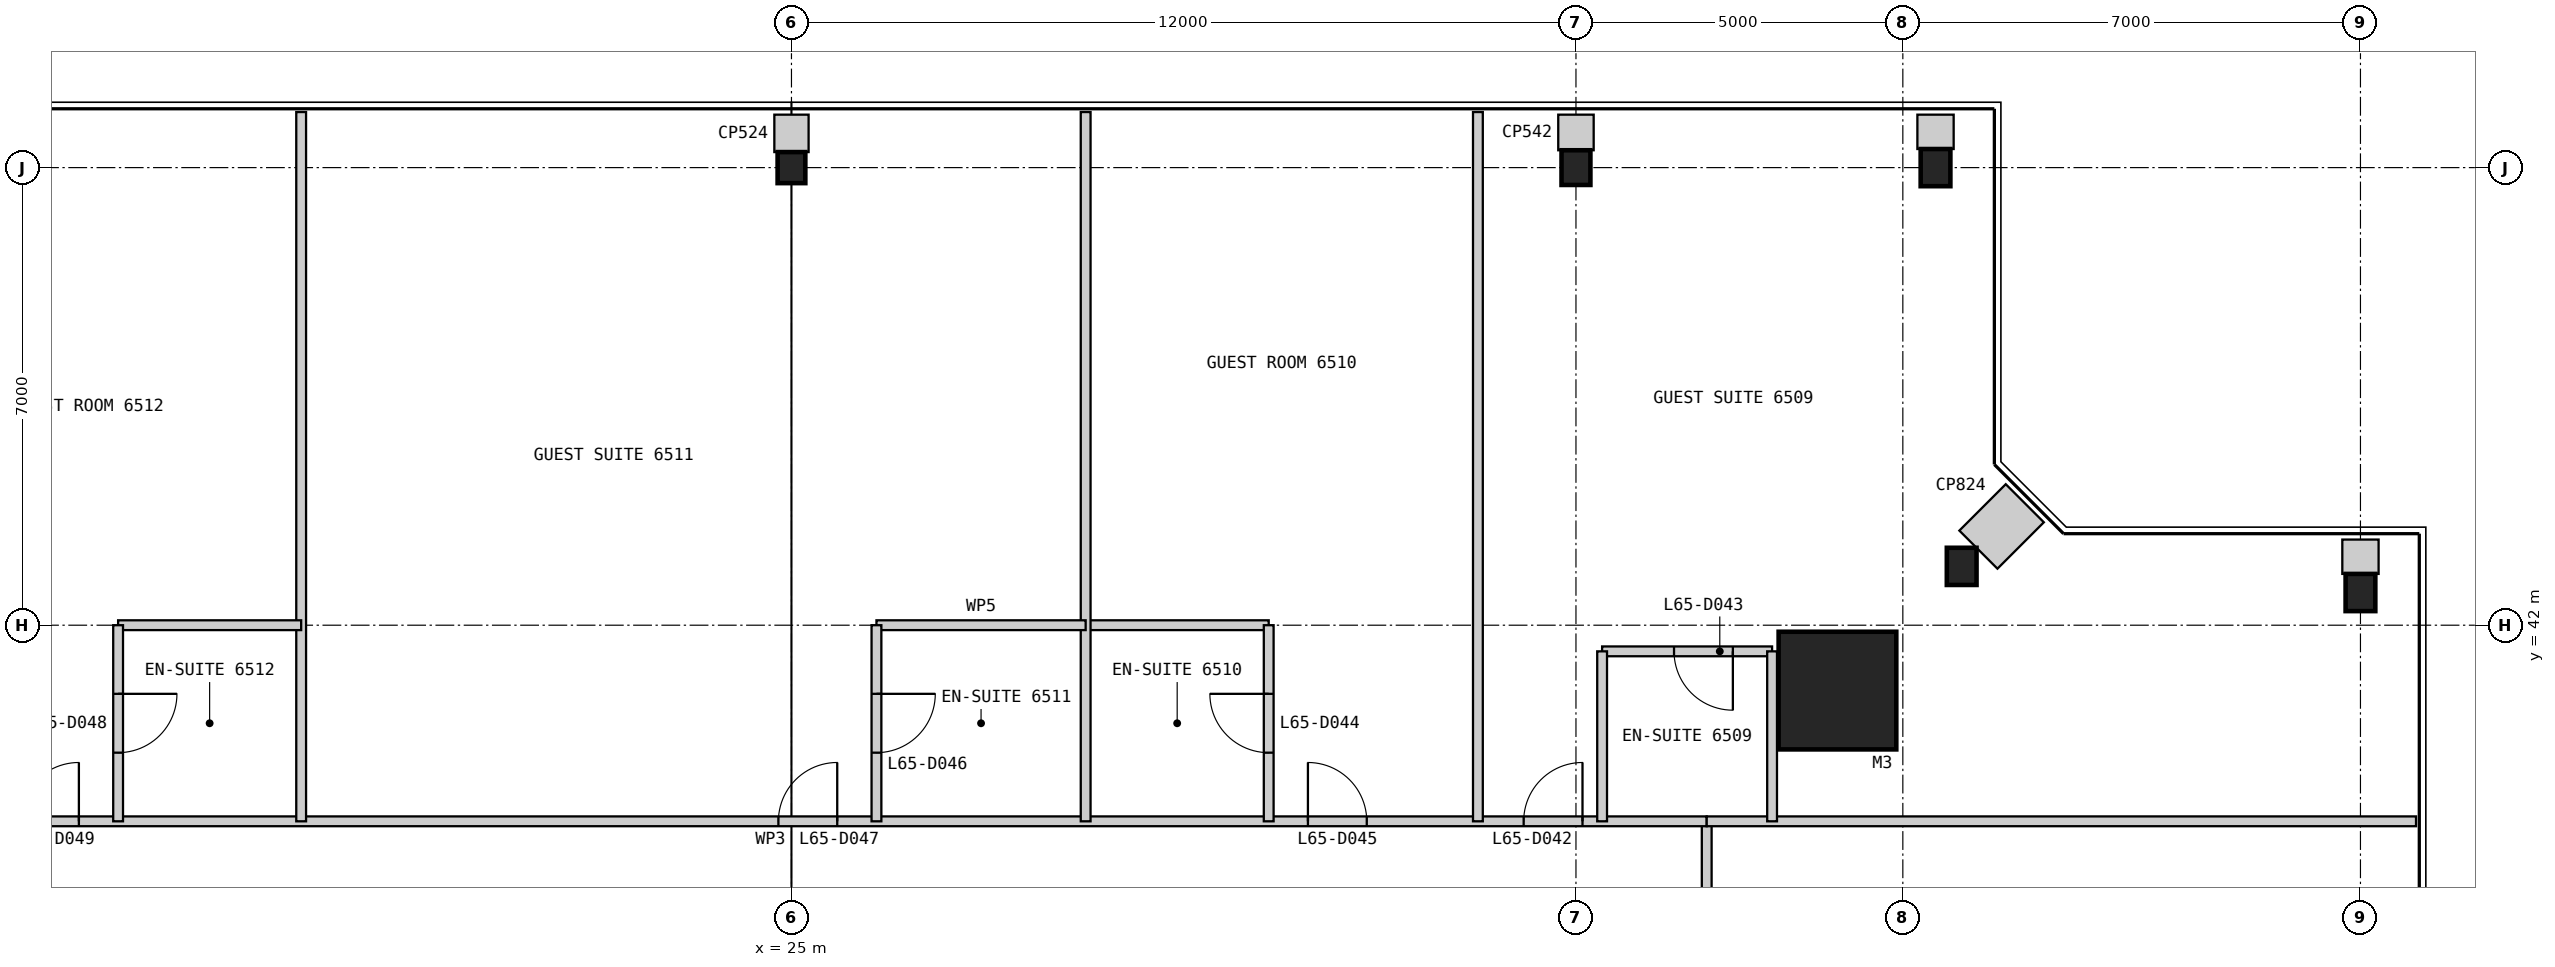
"""IFC4 building model, lengths in metres.
Left out: names, types, materials, properties, quantities, classifications, styles, units other than length and angle.
Written with IfcOpenShell. Run it as: python <this file> out.ifc"""

import sys

from ifc_helpers import new_model, si_unit, direction, frame, frame_2d, origin, origin_2d, place, context, subcontext, project, spatial, rectangle, i_section, extrude, element, fill, save


model = new_model("IFC4")
c1 = context("Model", 3, precision=1e-05, world=origin(), true_north=direction((0.0, 1.0)))
c2 = subcontext(c1, "Body", "Model", "MODEL_VIEW")
j1 = project(units=[si_unit("LENGTHUNIT", "METRE"), si_unit("PLANEANGLEUNIT", "RADIAN")], contexts=[c1])
p1 = place(None, origin())
s1 = spatial("IfcSite", under=j1, at=p1, CompositionType="ELEMENT")
p2 = place(p1, origin())
s2 = spatial("IfcBuilding", under=s1, at=p2, CompositionType="ELEMENT")
p3 = place(p2, frame((0.0, 0.0, 273.0)))
s3 = spatial("IfcBuildingStorey", under=s2, at=p3, CompositionType="ELEMENT", Elevation=273.0)
p4 = place(p3, frame((41.0, 41.0, 0.0), z_axis=(0.0, 0.0, 1.0), x_axis=(1.0, 0.0, 0.0)))
e1 = element("IfcColumn", 1, at=p4, inside=s3, PredefinedType="COLUMN", context=c2, shape_type="SweptSolid", body=[
    extrude(rectangle(XDim=1.8, YDim=1.8, at=origin_2d()), origin(), (0.0, 0.0, 1.0), 3.4),
])
for number, where, z_axis, x_axis in (
    (2, (49.0, 42.5, 0.0), (0.0, 0.0, 1.0), (1.0, 0.0, 0.0)),
    (3, (42.9, 42.9, 0.0), (0.0, 0.0, 1.0), (1.0, 0.0, 0.0)),
    (4, (42.5, 49.0, 0.0), (0.0, 0.0, 1.0), (1.0, 0.0, 0.0)),
):
    element("IfcColumn", number, at=place(p3, frame(where, z_axis=z_axis, x_axis=x_axis)), inside=s3, PredefinedType="COLUMN", context=c2, shape_type="SweptSolid", body=[
        extrude(i_section(OverallWidth=0.455, OverallDepth=0.569, WebThickness=0.078, FlangeThickness=0.125, at=origin_2d()), origin(), (0.0, 0.0, 1.0), 3.4),
    ])
p5 = place(p3, frame((37.0, 49.0, 0.0), z_axis=(0.0, 0.0, 1.0), x_axis=(1.0, 0.0, 0.0)))
e5 = element("IfcColumn", 5, at=p5, inside=s3, PredefinedType="COLUMN", context=c2, shape_type="SweptSolid", body=[
    extrude(i_section(OverallWidth=0.442, OverallDepth=0.531, WebThickness=0.066, FlangeThickness=0.106, at=origin_2d()), origin(), (0.0, 0.0, 1.0), 3.4),
])
p6 = place(p3, frame((25.0, 49.0, 0.0), z_axis=(0.0, 0.0, 1.0), x_axis=(1.0, 0.0, 0.0)))
e6 = element("IfcColumn", 6, at=p6, inside=s3, PredefinedType="COLUMN", context=c2, shape_type="SweptSolid", body=[
    extrude(i_section(OverallWidth=0.424, OverallDepth=0.475, WebThickness=0.048, FlangeThickness=0.077, at=origin_2d()), origin(), (0.0, 0.0, 1.0), 3.4),
])
p7 = place(p3, frame((39.0, 11.0, 0.0), z_axis=(0.0, 0.0, 1.0), x_axis=(0.0, 1.0, 0.0)))
e7 = element("IfcWall", 7, at=p7, inside=s3, PredefinedType="PARTITIONING", context=c2, shape_type="SweptSolid", body=[
    extrude(rectangle(XDim=28.0, YDim=0.15, at=frame_2d((14.0, 0.0))), origin(), (0.0, 0.0, 1.0), 2.844),
])
p8 = place(p7, frame((2.075, 0.0, 0.0)))
e8 = element("IfcOpeningElement", 8, at=p8, cuts=e7, PredefinedType="OPENING", context=c2, shape_type="SweptSolid", body=[
    extrude(rectangle(XDim=0.9, YDim=2.1, at=frame_2d((0.45, 1.05))), frame((0.0, 0.085, 0.0), z_axis=(0.0, -1.0, 0.0), x_axis=(1.0, 0.0, 0.0)), (0.0, 0.0, 1.0), 0.17),
])
p9 = place(p7, frame((5.2, 0.0, 0.0)))
e9 = element("IfcOpeningElement", 9, at=p9, cuts=e7, PredefinedType="OPENING", context=c2, shape_type="SweptSolid", body=[
    extrude(rectangle(XDim=0.9, YDim=2.1, at=frame_2d((0.45, 1.05))), frame((0.0, 0.085, 0.0), z_axis=(0.0, -1.0, 0.0), x_axis=(1.0, 0.0, 0.0)), (0.0, 0.0, 1.0), 0.17),
])
p10 = place(p7, frame((13.3, 0.0, 0.0)))
e10 = element("IfcOpeningElement", 10, at=p10, cuts=e7, PredefinedType="OPENING", context=c2, shape_type="SweptSolid", body=[
    extrude(rectangle(XDim=0.9, YDim=2.1, at=frame_2d((0.45, 1.05))), frame((0.0, 0.085, 0.0), z_axis=(0.0, -1.0, 0.0), x_axis=(1.0, 0.0, 0.0)), (0.0, 0.0, 1.0), 0.17),
])
p11 = place(p7, frame((24.9, 0.0, 0.0)))
e11 = element("IfcOpeningElement", 11, at=p11, cuts=e7, PredefinedType="OPENING", context=c2, shape_type="SweptSolid", body=[
    extrude(rectangle(XDim=0.9, YDim=2.1, at=frame_2d((0.45, 1.05))), frame((0.0, 0.085, 0.0), z_axis=(0.0, -1.0, 0.0), x_axis=(1.0, 0.0, 0.0)), (0.0, 0.0, 1.0), 0.17),
])
p12 = place(p3, frame((39.0, 39.0, 0.0), z_axis=(0.0, 0.0, 1.0), x_axis=(-1.0, 0.0, 0.0)))
e12 = element("IfcWall", 12, at=p12, inside=s3, PredefinedType="PARTITIONING", context=c2, shape_type="SweptSolid", body=[
    extrude(rectangle(XDim=28.0, YDim=0.15, at=frame_2d((14.0, 0.0))), origin(), (0.0, 0.0, 1.0), 2.844),
])
p13 = place(p12, frame((1.9, 0.0, 0.0)))
e13 = element("IfcOpeningElement", 13, at=p13, cuts=e12, PredefinedType="OPENING", context=c2, shape_type="SweptSolid", body=[
    extrude(rectangle(XDim=0.9, YDim=2.1, at=frame_2d((0.45, 1.05))), frame((0.0, 0.085, 0.0), z_axis=(0.0, -1.0, 0.0), x_axis=(1.0, 0.0, 0.0)), (0.0, 0.0, 1.0), 0.17),
])
p14 = place(p12, frame((5.2, 0.0, 0.0)))
e14 = element("IfcOpeningElement", 14, at=p14, cuts=e12, PredefinedType="OPENING", context=c2, shape_type="SweptSolid", body=[
    extrude(rectangle(XDim=0.9, YDim=2.1, at=frame_2d((0.45, 1.05))), frame((0.0, 0.085, 0.0), z_axis=(0.0, -1.0, 0.0), x_axis=(1.0, 0.0, 0.0)), (0.0, 0.0, 1.0), 0.17),
])
p15 = place(p12, frame((13.3, 0.0, 0.0)))
e15 = element("IfcOpeningElement", 15, at=p15, cuts=e12, PredefinedType="OPENING", context=c2, shape_type="SweptSolid", body=[
    extrude(rectangle(XDim=0.9, YDim=2.1, at=frame_2d((0.45, 1.05))), frame((0.0, 0.085, 0.0), z_axis=(0.0, -1.0, 0.0), x_axis=(1.0, 0.0, 0.0)), (0.0, 0.0, 1.0), 0.17),
])
p16 = place(p12, frame((24.9, 0.0, 0.0)))
e16 = element("IfcOpeningElement", 16, at=p16, cuts=e12, PredefinedType="OPENING", context=c2, shape_type="SweptSolid", body=[
    extrude(rectangle(XDim=0.9, YDim=2.1, at=frame_2d((0.45, 1.05))), frame((0.0, 0.085, 0.0), z_axis=(0.0, -1.0, 0.0), x_axis=(1.0, 0.0, 0.0)), (0.0, 0.0, 1.0), 0.17),
])
p17 = place(p3, frame((49.85, 39.0, 0.0), z_axis=(0.0, 0.0, 1.0), x_axis=(-1.0, 0.0, 0.0)))
e17 = element("IfcWall", 17, at=p17, inside=s3, PredefinedType="PARTITIONING", context=c2, shape_type="SweptSolid", body=[
    extrude(rectangle(XDim=10.85, YDim=0.15, at=frame_2d((5.425, 0.0))), origin(), (0.0, 0.0, 1.0), 2.844),
])
p18 = place(p3, frame((40.0, 41.6, 0.0), z_axis=(0.0, 0.0, 1.0), x_axis=(-1.0, 0.0, 0.0)))
e18 = element("IfcWall", 18, at=p18, inside=s3, PredefinedType="PARTITIONING", context=c2, shape_type="SweptSolid", body=[
    extrude(rectangle(XDim=2.6, YDim=0.15, at=frame_2d((1.3, 0.0))), origin(), (0.0, 0.0, 1.0), 3.25),
])
p19 = place(p18, frame((0.6, 0.0, 0.0)))
e19 = element("IfcOpeningElement", 19, at=p19, cuts=e18, PredefinedType="OPENING", context=c2, shape_type="SweptSolid", body=[
    extrude(rectangle(XDim=0.9, YDim=2.1, at=frame_2d((0.45, 1.05))), frame((0.0, 0.085, 0.0), z_axis=(0.0, -1.0, 0.0), x_axis=(1.0, 0.0, 0.0)), (0.0, 0.0, 1.0), 0.17),
])
for number, where, z_axis, x_axis in (
    (20, (40.0, 41.6, 0.0), (0.0, 0.0, 1.0), (0.0, -1.0, 0.0)),
    (21, (37.4, 41.6, 0.0), (0.0, 0.0, 1.0), (0.0, -1.0, 0.0)),
):
    element("IfcWall", number, at=place(p3, frame(where, z_axis=z_axis, x_axis=x_axis)), inside=s3, PredefinedType="PARTITIONING", context=c2, shape_type="SweptSolid", body=[
        extrude(rectangle(XDim=2.6, YDim=0.15, at=frame_2d((1.3, 0.0))), origin(), (0.0, 0.0, 1.0), 3.25),
    ])
p20 = place(p3, frame((35.5, 49.85, 0.0), z_axis=(0.0, 0.0, 1.0), x_axis=(0.0, -1.0, 0.0)))
e22 = element("IfcWall", 22, at=p20, inside=s3, PredefinedType="PARTITIONING", context=c2, shape_type="SweptSolid", body=[
    extrude(rectangle(XDim=10.85, YDim=0.15, at=frame_2d((5.425, 0.0))), origin(), (0.0, 0.0, 1.0), 3.25),
])
p21 = place(p3, frame((32.3, 42.0, 0.0), z_axis=(0.0, 0.0, 1.0), x_axis=(-1.0, 0.0, 0.0)))
e23 = element("IfcWall", 23, at=p21, inside=s3, PredefinedType="PARTITIONING", context=c2, shape_type="SweptSolid", body=[
    extrude(rectangle(XDim=2.8, YDim=0.15, at=frame_2d((1.4, 0.0))), origin(), (0.0, 0.0, 1.0), 3.25),
])
p22 = place(p3, frame((32.3, 42.0, 0.0), z_axis=(0.0, 0.0, 1.0), x_axis=(0.0, -1.0, 0.0)))
e24 = element("IfcWall", 24, at=p22, inside=s3, PredefinedType="PARTITIONING", context=c2, shape_type="SweptSolid", body=[
    extrude(rectangle(XDim=3.0, YDim=0.15, at=frame_2d((1.5, 0.0))), origin(), (0.0, 0.0, 1.0), 3.25),
])
p23 = place(p22, frame((1.05, 0.0, 0.0)))
e25 = element("IfcOpeningElement", 25, at=p23, cuts=e24, PredefinedType="OPENING", context=c2, shape_type="SweptSolid", body=[
    extrude(rectangle(XDim=0.9, YDim=2.1, at=frame_2d((0.45, 1.05))), frame((0.0, 0.085, 0.0), z_axis=(0.0, -1.0, 0.0), x_axis=(1.0, 0.0, 0.0)), (0.0, 0.0, 1.0), 0.17),
])
p24 = place(p3, frame((29.5, 49.85, 0.0), z_axis=(0.0, 0.0, 1.0), x_axis=(0.0, -1.0, 0.0)))
e26 = element("IfcWall", 26, at=p24, inside=s3, PredefinedType="PARTITIONING", context=c2, shape_type="SweptSolid", body=[
    extrude(rectangle(XDim=10.85, YDim=0.15, at=frame_2d((5.425, 0.0))), origin(), (0.0, 0.0, 1.0), 3.25),
])
p25 = place(p3, frame((29.5, 42.0, 0.0), z_axis=(0.0, 0.0, 1.0), x_axis=(-1.0, 0.0, 0.0)))
e27 = element("IfcWall", 27, at=p25, inside=s3, PredefinedType="PARTITIONING", context=c2, shape_type="SweptSolid", body=[
    extrude(rectangle(XDim=3.2, YDim=0.15, at=frame_2d((1.6, 0.0))), origin(), (0.0, 0.0, 1.0), 3.25),
])
p26 = place(p3, frame((26.3, 42.0, 0.0), z_axis=(0.0, 0.0, 1.0), x_axis=(0.0, -1.0, 0.0)))
e28 = element("IfcWall", 28, at=p26, inside=s3, PredefinedType="PARTITIONING", context=c2, shape_type="SweptSolid", body=[
    extrude(rectangle(XDim=3.0, YDim=0.15, at=frame_2d((1.5, 0.0))), origin(), (0.0, 0.0, 1.0), 3.25),
])
p27 = place(p26, frame((1.05, 0.0, 0.0)))
e29 = element("IfcOpeningElement", 29, at=p27, cuts=e28, PredefinedType="OPENING", context=c2, shape_type="SweptSolid", body=[
    extrude(rectangle(XDim=0.9, YDim=2.1, at=frame_2d((0.45, 1.05))), frame((0.0, 0.085, 0.0), z_axis=(0.0, -1.0, 0.0), x_axis=(1.0, 0.0, 0.0)), (0.0, 0.0, 1.0), 0.17),
])
p28 = place(p3, frame((17.5, 49.85, 0.0), z_axis=(0.0, 0.0, 1.0), x_axis=(0.0, -1.0, 0.0)))
e30 = element("IfcWall", 30, at=p28, inside=s3, PredefinedType="PARTITIONING", context=c2, shape_type="SweptSolid", body=[
    extrude(rectangle(XDim=10.85, YDim=0.15, at=frame_2d((5.425, 0.0))), origin(), (0.0, 0.0, 1.0), 3.25),
])
p29 = place(p3, frame((17.5, 42.0, 0.0), z_axis=(0.0, 0.0, 1.0), x_axis=(-1.0, 0.0, 0.0)))
e31 = element("IfcWall", 31, at=p29, inside=s3, PredefinedType="PARTITIONING", context=c2, shape_type="SweptSolid", body=[
    extrude(rectangle(XDim=2.8, YDim=0.15, at=frame_2d((1.4, 0.0))), origin(), (0.0, 0.0, 1.0), 3.25),
])
p30 = place(p3, frame((14.7, 42.0, 0.0), z_axis=(0.0, 0.0, 1.0), x_axis=(0.0, -1.0, 0.0)))
e32 = element("IfcWall", 32, at=p30, inside=s3, PredefinedType="PARTITIONING", context=c2, shape_type="SweptSolid", body=[
    extrude(rectangle(XDim=3.0, YDim=0.15, at=frame_2d((1.5, 0.0))), origin(), (0.0, 0.0, 1.0), 3.25),
])
p31 = place(p30, frame((1.05, 0.0, 0.0)))
e33 = element("IfcOpeningElement", 33, at=p31, cuts=e32, PredefinedType="OPENING", context=c2, shape_type="SweptSolid", body=[
    extrude(rectangle(XDim=0.9, YDim=2.1, at=frame_2d((0.45, 1.05))), frame((0.0, 0.085, 0.0), z_axis=(0.0, -1.0, 0.0), x_axis=(1.0, 0.0, 0.0)), (0.0, 0.0, 1.0), 0.17),
])
p32 = place(p3, frame((49.0, 43.31, 0.0), z_axis=(0.0, 0.0, 1.0), x_axis=(0.0, -1.0, 0.0)))
e34 = element("IfcWall", 34, at=p32, inside=s3, PredefinedType="PARTITIONING", context=c2, shape_type="SweptSolid", body=[
    extrude(rectangle(XDim=0.526, YDim=0.555, at=frame_2d((0.263, 0.0))), origin(), (0.0, 0.0, 1.0), 3.25),
])
p33 = place(p3, frame((43.866, 43.866, 0.0), z_axis=(0.0, 0.0, 1.0), x_axis=(-0.707106781187, -0.707106781187, 0.0)))
e35 = element("IfcWall", 35, at=p33, inside=s3, PredefinedType="PARTITIONING", context=c2, shape_type="SweptSolid", body=[
    extrude(rectangle(XDim=1.004, YDim=0.824, at=frame_2d((0.502, 0.0))), origin(), (0.0, 0.0, 1.0), 3.25),
])
p34 = place(p3, frame((42.5, 49.81, 0.0), z_axis=(0.0, 0.0, 1.0), x_axis=(0.0, -1.0, 0.0)))
e36 = element("IfcWall", 36, at=p34, inside=s3, PredefinedType="PARTITIONING", context=c2, shape_type="SweptSolid", body=[
    extrude(rectangle(XDim=0.526, YDim=0.555, at=frame_2d((0.263, 0.0))), origin(), (0.0, 0.0, 1.0), 3.25),
])
p35 = place(p3, frame((37.0, 49.81, 0.0), z_axis=(0.0, 0.0, 1.0), x_axis=(0.0, -1.0, 0.0)))
e37 = element("IfcWall", 37, at=p35, inside=s3, PredefinedType="PARTITIONING", context=c2, shape_type="SweptSolid", body=[
    extrude(rectangle(XDim=0.545, YDim=0.542, at=frame_2d((0.272, 0.0))), origin(), (0.0, 0.0, 1.0), 3.25),
])
p36 = place(p3, frame((25.0, 49.81, 0.0), z_axis=(0.0, 0.0, 1.0), x_axis=(0.0, -1.0, 0.0)))
e38 = element("IfcWall", 38, at=p36, inside=s3, PredefinedType="PARTITIONING", context=c2, shape_type="SweptSolid", body=[
    extrude(rectangle(XDim=0.573, YDim=0.524, at=frame_2d((0.286, 0.0))), origin(), (0.0, 0.0, 1.0), 3.25),
])
p37 = place(p13, frame((0.9, 0.0, 0.0), z_axis=(0.0, 0.0, 1.0), x_axis=(-1.0, 0.0, 0.0)))
e39 = element("IfcDoor", 39, at=p37, inside=s3, OperationType="SINGLE_SWING_RIGHT", PredefinedType="DOOR", context=c2, shape_type="SweptSolid", body=[
    extrude(rectangle(XDim=0.9, YDim=2.1, at=frame_2d((0.45, 1.05))), frame((0.0, 0.025, 0.0), z_axis=(0.0, -1.0, 0.0), x_axis=(1.0, 0.0, 0.0)), (0.0, 0.0, 1.0), 0.05),
])
fill(e13, e39)
p38 = place(p19, origin())
e40 = element("IfcDoor", 40, at=p38, inside=s3, OperationType="SINGLE_SWING_LEFT", PredefinedType="DOOR", context=c2, shape_type="SweptSolid", body=[
    extrude(rectangle(XDim=0.9, YDim=2.1, at=frame_2d((0.45, 1.05))), frame((0.0, 0.025, 0.0), z_axis=(0.0, -1.0, 0.0), x_axis=(1.0, 0.0, 0.0)), (0.0, 0.0, 1.0), 0.05),
])
fill(e19, e40)
p39 = place(p23, frame((0.9, 0.0, 0.0), z_axis=(0.0, 0.0, 1.0), x_axis=(-1.0, 0.0, 0.0)))
e41 = element("IfcDoor", 41, at=p39, inside=s3, OperationType="SINGLE_SWING_RIGHT", PredefinedType="DOOR", context=c2, shape_type="SweptSolid", body=[
    extrude(rectangle(XDim=0.9, YDim=2.1, at=frame_2d((0.45, 1.05))), frame((0.0, 0.025, 0.0), z_axis=(0.0, -1.0, 0.0), x_axis=(1.0, 0.0, 0.0)), (0.0, 0.0, 1.0), 0.05),
])
fill(e25, e41)
p40 = place(p14, frame((0.9, 0.0, 0.0), z_axis=(0.0, 0.0, 1.0), x_axis=(-1.0, 0.0, 0.0)))
e42 = element("IfcDoor", 42, at=p40, inside=s3, OperationType="SINGLE_SWING_LEFT", PredefinedType="DOOR", context=c2, shape_type="SweptSolid", body=[
    extrude(rectangle(XDim=0.9, YDim=2.1, at=frame_2d((0.45, 1.05))), frame((0.0, 0.025, 0.0), z_axis=(0.0, -1.0, 0.0), x_axis=(1.0, 0.0, 0.0)), (0.0, 0.0, 1.0), 0.05),
])
fill(e14, e42)
p41 = place(p27, origin())
e43 = element("IfcDoor", 43, at=p41, inside=s3, OperationType="SINGLE_SWING_LEFT", PredefinedType="DOOR", context=c2, shape_type="SweptSolid", body=[
    extrude(rectangle(XDim=0.9, YDim=2.1, at=frame_2d((0.45, 1.05))), frame((0.0, 0.025, 0.0), z_axis=(0.0, -1.0, 0.0), x_axis=(1.0, 0.0, 0.0)), (0.0, 0.0, 1.0), 0.05),
])
fill(e29, e43)
p42 = place(p15, frame((0.9, 0.0, 0.0), z_axis=(0.0, 0.0, 1.0), x_axis=(-1.0, 0.0, 0.0)))
e44 = element("IfcDoor", 44, at=p42, inside=s3, OperationType="SINGLE_SWING_RIGHT", PredefinedType="DOOR", context=c2, shape_type="SweptSolid", body=[
    extrude(rectangle(XDim=0.9, YDim=2.1, at=frame_2d((0.45, 1.05))), frame((0.0, 0.025, 0.0), z_axis=(0.0, -1.0, 0.0), x_axis=(1.0, 0.0, 0.0)), (0.0, 0.0, 1.0), 0.05),
])
fill(e15, e44)
p43 = place(p31, origin())
e45 = element("IfcDoor", 45, at=p43, inside=s3, OperationType="SINGLE_SWING_LEFT", PredefinedType="DOOR", context=c2, shape_type="SweptSolid", body=[
    extrude(rectangle(XDim=0.9, YDim=2.1, at=frame_2d((0.45, 1.05))), frame((0.0, 0.025, 0.0), z_axis=(0.0, -1.0, 0.0), x_axis=(1.0, 0.0, 0.0)), (0.0, 0.0, 1.0), 0.05),
])
fill(e33, e45)
p44 = place(p16, frame((0.9, 0.0, 0.0), z_axis=(0.0, 0.0, 1.0), x_axis=(-1.0, 0.0, 0.0)))
e46 = element("IfcDoor", 46, at=p44, inside=s3, OperationType="SINGLE_SWING_RIGHT", PredefinedType="DOOR", context=c2, shape_type="SweptSolid", body=[
    extrude(rectangle(XDim=0.9, YDim=2.1, at=frame_2d((0.45, 1.05))), frame((0.0, 0.025, 0.0), z_axis=(0.0, -1.0, 0.0), x_axis=(1.0, 0.0, 0.0)), (0.0, 0.0, 1.0), 0.05),
])
fill(e16, e46)
save(model, sys.argv[1])
